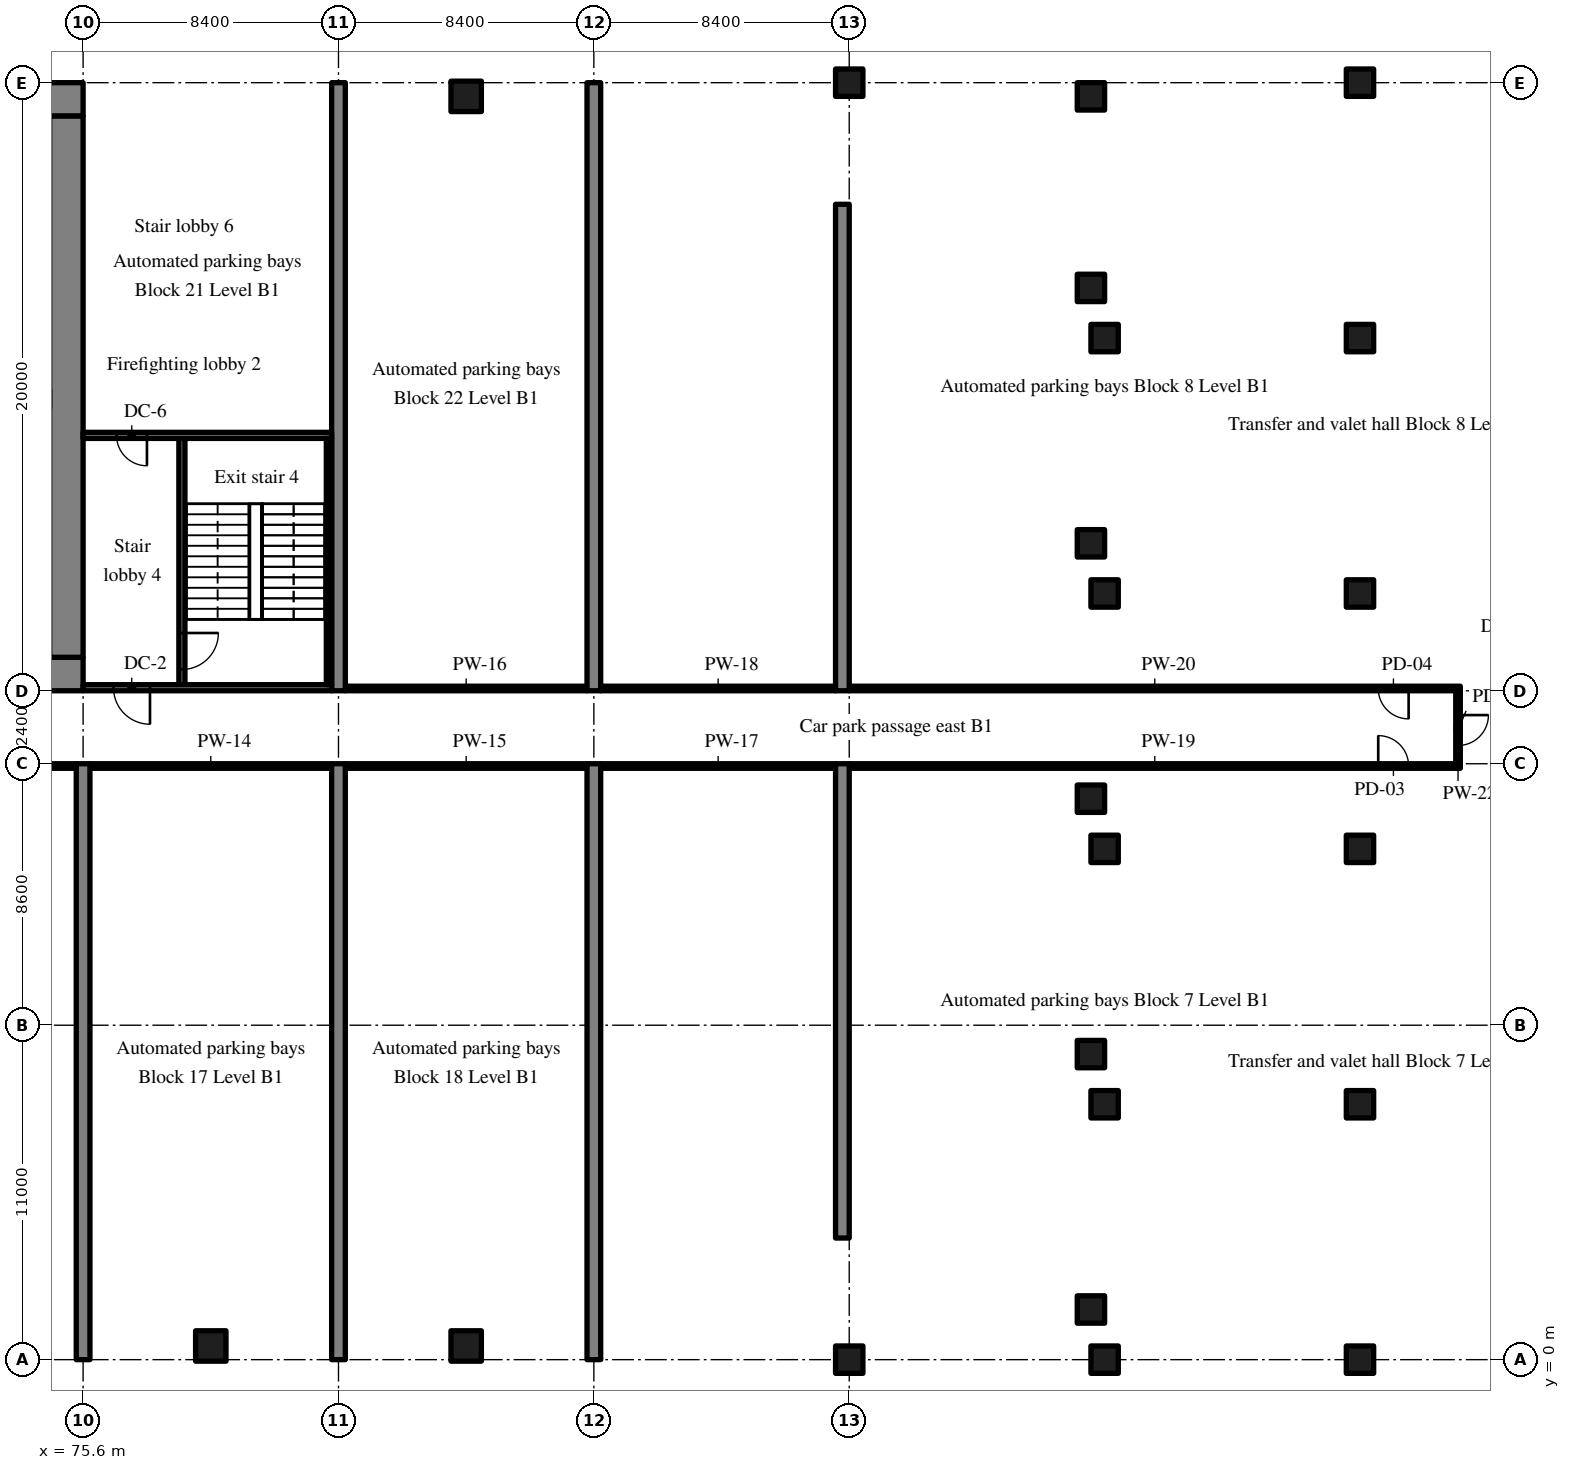
"""IFC4 building model, lengths in metres.
Left out: names, types, materials, properties, quantities, classifications, styles, units other than length and angle.
Written with IfcOpenShell. Run it as: python <this file> out.ifc"""

import sys

from ifc_helpers import new_model, si_unit, direction, frame, frame_2d, origin, origin_2d, place, context, subcontext, project, spatial, rectangle, extrude, source, transform, mapped, element, fill, save


model = new_model("IFC4")
c1 = context("Model", 3, precision=1e-05, world=origin(), true_north=direction((0.0, 1.0)))
c2 = subcontext(c1, "Body", "Model", "MODEL_VIEW")
j1 = project(units=[si_unit("LENGTHUNIT", "METRE"), si_unit("PLANEANGLEUNIT", "RADIAN")], contexts=[c1])
p1 = place(None, origin())
s1 = spatial("IfcSite", under=j1, at=p1, CompositionType="ELEMENT")
p2 = place(p1, origin())
s2 = spatial("IfcBuilding", under=s1, at=p2, CompositionType="ELEMENT")
p3 = place(p2, frame((0.0, 0.0, -4.5)))
s3 = spatial("IfcBuildingStorey", under=s2, at=p3, CompositionType="ELEMENT", Elevation=-4.5)
m1 = source(origin(), c2, "Body", "SweptSolid", [
    extrude(rectangle(XDim=50.4, YDim=1.1, at=frame_2d((25.2, 0.0))), origin(), (0.0, 0.0, 1.0), 4.22),
])
p4 = place(p3, frame((25.2, 22.55, 0.0), z_axis=(0.0, 0.0, 1.0), x_axis=(1.0, 0.0, 0.0)))
e1 = element("IfcWall", 1, at=p4, inside=s3, PredefinedType="SHEAR", context=c2, shape_type="MappedRepresentation", body=[
    mapped(m1, transform((0.0, 0.0, 0.0), scale=1.0)),
])
m2 = source(origin(), c2, "Body", "SweptSolid", [
    extrude(rectangle(XDim=1.8, YDim=2.1, at=frame_2d((0.9, 1.05))), frame((0.0, 0.56, 0.0), z_axis=(0.0, -1.0, 0.0), x_axis=(1.0, 0.0, 0.0)), (0.0, 0.0, 1.0), 1.12),
])
p5 = place(p4, frame((15.9, 0.0, 0.0)))
e2 = element("IfcOpeningElement", 2, at=p5, cuts=e1, PredefinedType="OPENING", context=c2, shape_type="MappedRepresentation", body=[
    mapped(m2, transform((0.0, 0.0, 0.0), scale=1.0)),
])
m3 = source(origin(), c2, "Body", "SweptSolid", [
    extrude(rectangle(XDim=1.2, YDim=2.1, at=frame_2d((0.6, 1.05))), frame((0.0, 0.56, 0.0), z_axis=(0.0, -1.0, 0.0), x_axis=(1.0, 0.0, 0.0)), (0.0, 0.0, 1.0), 1.12),
])
p6 = place(p4, frame((27.0, 0.0, 0.0)))
e3 = element("IfcOpeningElement", 3, at=p6, cuts=e1, PredefinedType="OPENING", context=c2, shape_type="MappedRepresentation", body=[
    mapped(m3, transform((0.0, 0.0, 0.0), scale=1.0)),
])
m4 = source(origin(), c2, "Body", "SweptSolid", [
    extrude(rectangle(XDim=0.9, YDim=2.1, at=frame_2d((0.45, 1.05))), frame((0.0, 0.56, 0.0), z_axis=(0.0, -1.0, 0.0), x_axis=(1.0, 0.0, 0.0)), (0.0, 0.0, 1.0), 1.12),
])
p7 = place(p4, frame((34.5, 0.0, 0.0)))
e4 = element("IfcOpeningElement", 4, at=p7, cuts=e1, PredefinedType="OPENING", context=c2, shape_type="MappedRepresentation", body=[
    mapped(m4, transform((0.0, 0.0, 0.0), scale=1.0)),
])
p8 = place(p4, frame((31.5, 0.0, 0.0)))
e5 = element("IfcOpeningElement", 5, at=p8, cuts=e1, PredefinedType="OPENING", context=c2, shape_type="MappedRepresentation", body=[
    mapped(m4, transform((0.0, 0.0, 0.0), scale=1.0)),
])
p9 = place(p4, frame((39.75, 0.0, 0.0)))
e6 = element("IfcOpeningElement", 6, at=p9, cuts=e1, PredefinedType="OPENING", context=c2, shape_type="MappedRepresentation", body=[
    mapped(m4, transform((0.0, 0.0, 0.0), scale=1.0)),
])
p10 = place(p4, frame((36.75, 0.0, 0.0)))
e7 = element("IfcOpeningElement", 7, at=p10, cuts=e1, PredefinedType="OPENING", context=c2, shape_type="MappedRepresentation", body=[
    mapped(m4, transform((0.0, 0.0, 0.0), scale=1.0)),
])
p11 = place(p4, frame((6.425, 0.0, 0.0)))
e8 = element("IfcOpeningElement", 8, at=p11, cuts=e1, PredefinedType="OPENING", context=c2, shape_type="MappedRepresentation", body=[
    mapped(m3, transform((0.0, 0.0, 0.0), scale=1.0)),
])
p12 = place(p4, frame((47.675, 0.0, 0.0)))
e9 = element("IfcOpeningElement", 9, at=p12, cuts=e1, PredefinedType="OPENING", context=c2, shape_type="MappedRepresentation", body=[
    mapped(m3, transform((0.0, 0.0, 0.0), scale=1.0)),
])
p13 = place(p3, frame((25.2, 41.45, 0.0), z_axis=(0.0, 0.0, 1.0), x_axis=(1.0, 0.0, 0.0)))
e10 = element("IfcWall", 10, at=p13, inside=s3, PredefinedType="SHEAR", context=c2, shape_type="MappedRepresentation", body=[
    mapped(m1, transform((0.0, 0.0, 0.0), scale=1.0)),
])
m5 = source(origin(), c2, "Body", "SweptSolid", [
    extrude(rectangle(XDim=17.8, YDim=1.1, at=frame_2d((8.9, 0.0))), origin(), (0.0, 0.0, 1.0), 4.22),
])
p14 = place(p3, frame((75.05, 23.1, 0.0), z_axis=(0.0, 0.0, 1.0), x_axis=(0.0, 1.0, 0.0)))
e11 = element("IfcWall", 11, at=p14, inside=s3, PredefinedType="SHEAR", context=c2, shape_type="MappedRepresentation", body=[
    mapped(m5, transform((0.0, 0.0, 0.0), scale=1.0)),
])
m6 = source(origin(), c2, "Body", "SweptSolid", [
    extrude(rectangle(XDim=19.6, YDim=0.45, at=frame_2d((9.8, 0.0))), origin(), (0.0, 0.0, 1.0), 4.22),
])
for number, where, z_axis, x_axis in (
    (12, (75.6, 0.0, 0.0), (0.0, 0.0, 1.0), (0.0, 1.0, 0.0)),
    (13, (84.0, 0.0, 0.0), (0.0, 0.0, 1.0), (0.0, 1.0, 0.0)),
):
    element("IfcWall", number, at=place(p3, frame(where, z_axis=z_axis, x_axis=x_axis)), inside=s3, PredefinedType="SHEAR", context=c2, shape_type="MappedRepresentation", body=[
        mapped(m6, transform((0.0, 0.0, 0.0), scale=1.0)),
    ])
m7 = source(origin(), c2, "Body", "SweptSolid", [
    extrude(rectangle(XDim=20.0, YDim=0.45, at=frame_2d((10.0, 0.0))), origin(), (0.0, 0.0, 1.0), 4.22),
])
p15 = place(p3, frame((84.0, 22.0, 0.0), z_axis=(0.0, 0.0, 1.0), x_axis=(0.0, 1.0, 0.0)))
e14 = element("IfcWall", 14, at=p15, inside=s3, PredefinedType="SHEAR", context=c2, shape_type="MappedRepresentation", body=[
    mapped(m7, transform((0.0, 0.0, 0.0), scale=1.0)),
])
p16 = place(p3, frame((92.4, 0.0, 0.0), z_axis=(0.0, 0.0, 1.0), x_axis=(0.0, 1.0, 0.0)))
e15 = element("IfcWall", 15, at=p16, inside=s3, PredefinedType="SHEAR", context=c2, shape_type="MappedRepresentation", body=[
    mapped(m6, transform((0.0, 0.0, 0.0), scale=1.0)),
])
p17 = place(p3, frame((92.4, 22.0, 0.0), z_axis=(0.0, 0.0, 1.0), x_axis=(0.0, 1.0, 0.0)))
e16 = element("IfcWall", 16, at=p17, inside=s3, PredefinedType="SHEAR", context=c2, shape_type="MappedRepresentation", body=[
    mapped(m7, transform((0.0, 0.0, 0.0), scale=1.0)),
])
m8 = source(origin(), c2, "Body", "SweptSolid", [
    extrude(rectangle(XDim=15.6, YDim=0.45, at=frame_2d((7.8, 0.0))), origin(), (0.0, 0.0, 1.0), 4.22),
])
p18 = place(p3, frame((100.575, 4.0, 0.0), z_axis=(0.0, 0.0, 1.0), x_axis=(0.0, 1.0, 0.0)))
e17 = element("IfcWall", 17, at=p18, inside=s3, PredefinedType="SHEAR", context=c2, shape_type="MappedRepresentation", body=[
    mapped(m8, transform((0.0, 0.0, 0.0), scale=1.0)),
])
m9 = source(origin(), c2, "Body", "SweptSolid", [
    extrude(rectangle(XDim=16.0, YDim=0.45, at=frame_2d((8.0, 0.0))), origin(), (0.0, 0.0, 1.0), 4.22),
])
p19 = place(p3, frame((100.575, 22.0, 0.0), z_axis=(0.0, 0.0, 1.0), x_axis=(0.0, 1.0, 0.0)))
e18 = element("IfcWall", 18, at=p19, inside=s3, PredefinedType="SHEAR", context=c2, shape_type="MappedRepresentation", body=[
    mapped(m9, transform((0.0, 0.0, 0.0), scale=1.0)),
])
m10 = source(origin(), c2, "Body", "SweptSolid", [
    extrude(rectangle(XDim=1.0, YDim=1.0, at=origin_2d()), origin(), (0.0, 0.0, 1.0), 4.22),
])
for number, where, z_axis, x_axis in (
    (19, (79.8, 0.45, 0.0), (0.0, 0.0, 1.0), (1.0, 0.0, 0.0)),
    (20, (88.2, 0.45, 0.0), (0.0, 0.0, 1.0), (1.0, 0.0, 0.0)),
    (21, (88.2, 41.55, 0.0), (0.0, 0.0, 1.0), (1.0, 0.0, 0.0)),
):
    element("IfcColumn", number, at=place(p3, frame(where, z_axis=z_axis, x_axis=x_axis)), inside=s3, PredefinedType="COLUMN", context=c2, shape_type="MappedRepresentation", body=[
        mapped(m10, transform((0.0, 0.0, 0.0), scale=1.0)),
    ])
m11 = source(origin(), c2, "Body", "SweptSolid", [
    extrude(rectangle(XDim=0.9, YDim=0.9, at=origin_2d()), origin(), (0.0, 0.0, 1.0), 4.22),
])
for number, where, z_axis, x_axis in (
    (22, (108.75, 1.65, 0.0), (0.0, 0.0, 1.0), (1.0, 0.0, 0.0)),
    (23, (108.75, 10.05, 0.0), (0.0, 0.0, 1.0), (1.0, 0.0, 0.0)),
    (24, (108.75, 18.45, 0.0), (0.0, 0.0, 1.0), (1.0, 0.0, 0.0)),
    (25, (108.75, 26.85, 0.0), (0.0, 0.0, 1.0), (1.0, 0.0, 0.0)),
    (26, (108.75, 35.25, 0.0), (0.0, 0.0, 1.0), (1.0, 0.0, 0.0)),
    (27, (108.75, 41.55, 0.0), (0.0, 0.0, 1.0), (1.0, 0.0, 0.0)),
    (28, (100.8, 0.0, 0.0), (0.0, 0.0, 1.0), (1.0, 0.0, 0.0)),
    (29, (100.8, 42.0, 0.0), (0.0, 0.0, 1.0), (1.0, 0.0, 0.0)),
    (30, (109.2, 0.0, 0.0), (0.0, 0.0, 1.0), (1.0, 0.0, 0.0)),
    (31, (109.2, 8.4, 0.0), (0.0, 0.0, 1.0), (1.0, 0.0, 0.0)),
    (32, (109.2, 16.8, 0.0), (0.0, 0.0, 1.0), (1.0, 0.0, 0.0)),
    (33, (109.2, 25.2, 0.0), (0.0, 0.0, 1.0), (1.0, 0.0, 0.0)),
    (34, (109.2, 33.6, 0.0), (0.0, 0.0, 1.0), (1.0, 0.0, 0.0)),
    (35, (117.6, 0.0, 0.0), (0.0, 0.0, 1.0), (1.0, 0.0, 0.0)),
    (36, (117.6, 8.4, 0.0), (0.0, 0.0, 1.0), (1.0, 0.0, 0.0)),
    (37, (117.6, 16.8, 0.0), (0.0, 0.0, 1.0), (1.0, 0.0, 0.0)),
    (38, (117.6, 25.2, 0.0), (0.0, 0.0, 1.0), (1.0, 0.0, 0.0)),
    (39, (117.6, 33.6, 0.0), (0.0, 0.0, 1.0), (1.0, 0.0, 0.0)),
    (40, (117.6, 42.0, 0.0), (0.0, 0.0, 1.0), (1.0, 0.0, 0.0)),
):
    element("IfcColumn", number, at=place(p3, frame(where, z_axis=z_axis, x_axis=x_axis)), inside=s3, PredefinedType="COLUMN", context=c2, shape_type="MappedRepresentation", body=[
        mapped(m11, transform((0.0, 0.0, 0.0), scale=1.0)),
    ])
m12 = source(origin(), c2, "Body", "SweptSolid", [
    extrude(rectangle(XDim=8.3, YDim=0.2, at=frame_2d((4.15, 0.0))), origin(), (0.0, 0.0, 1.0), 4.22),
])
p20 = place(p3, frame((78.85, 22.1, 0.0), z_axis=(0.0, 0.0, 1.0), x_axis=(0.0, 1.0, 0.0)))
e41 = element("IfcWall", 41, at=p20, inside=s3, PredefinedType="SOLIDWALL", context=c2, shape_type="MappedRepresentation", body=[
    mapped(m12, transform((0.0, 0.0, 0.0), scale=1.0)),
])
m13 = source(origin(), c2, "Body", "SweptSolid", [
    extrude(rectangle(XDim=1.2, YDim=2.1, at=frame_2d((0.6, 1.05))), frame((0.0, 0.11, 0.0), z_axis=(0.0, -1.0, 0.0), x_axis=(1.0, 0.0, 0.0)), (0.0, 0.0, 1.0), 0.22),
])
p21 = place(p20, frame((0.6, 0.0, 0.0)))
e42 = element("IfcOpeningElement", 42, at=p21, cuts=e41, PredefinedType="OPENING", context=c2, shape_type="MappedRepresentation", body=[
    mapped(m13, transform((0.0, 0.0, 0.0), scale=1.0)),
])
m14 = source(origin(), c2, "Body", "SweptSolid", [
    extrude(rectangle(XDim=8.175, YDim=0.2, at=frame_2d((4.087, 0.0))), origin(), (0.0, 0.0, 1.0), 4.22),
])
p22 = place(p3, frame((83.775, 22.1, 0.0), z_axis=(0.0, 0.0, 1.0), x_axis=(-1.0, 0.0, 0.0)))
e43 = element("IfcWall", 43, at=p22, inside=s3, PredefinedType="SOLIDWALL", context=c2, shape_type="MappedRepresentation", body=[
    mapped(m14, transform((0.0, 0.0, 0.0), scale=1.0)),
])
p23 = place(p22, frame((5.975, 0.0, 0.0)))
e44 = element("IfcOpeningElement", 44, at=p23, cuts=e43, PredefinedType="OPENING", context=c2, shape_type="MappedRepresentation", body=[
    mapped(m13, transform((0.0, 0.0, 0.0), scale=1.0)),
])
p24 = place(p3, frame((83.775, 30.4, 0.0), z_axis=(0.0, 0.0, 1.0), x_axis=(-1.0, 0.0, 0.0)))
e45 = element("IfcWall", 45, at=p24, inside=s3, PredefinedType="SOLIDWALL", context=c2, shape_type="MappedRepresentation", body=[
    mapped(m14, transform((0.0, 0.0, 0.0), scale=1.0)),
])
m15 = source(origin(), c2, "Body", "SweptSolid", [
    extrude(rectangle(XDim=1.0, YDim=2.1, at=frame_2d((0.5, 1.05))), frame((0.0, 0.11, 0.0), z_axis=(0.0, -1.0, 0.0), x_axis=(1.0, 0.0, 0.0)), (0.0, 0.0, 1.0), 0.22),
])
p25 = place(p24, frame((6.075, 0.0, 0.0)))
e46 = element("IfcOpeningElement", 46, at=p25, cuts=e45, PredefinedType="OPENING", context=c2, shape_type="MappedRepresentation", body=[
    mapped(m15, transform((0.0, 0.0, 0.0), scale=1.0)),
])
m16 = source(origin(), c2, "Body", "SweptSolid", [
    extrude(rectangle(XDim=8.1, YDim=0.175, at=frame_2d((4.05, 0.0))), origin(), (0.0, 0.0, 1.0), 4.22),
])
p26 = place(p3, frame((83.688, 22.2, 0.0), z_axis=(0.0, 0.0, 1.0), x_axis=(0.0, 1.0, 0.0)))
e47 = element("IfcWall", 47, at=p26, inside=s3, PredefinedType="SOLIDWALL", context=c2, shape_type="MappedRepresentation", body=[
    mapped(m16, transform((0.0, 0.0, 0.0), scale=1.0)),
])
m17 = source(origin(), c2, "Body", "SweptSolid", [
    extrude(rectangle(XDim=7.95, YDim=0.15, at=frame_2d((3.975, 0.0))), origin(), (0.0, 0.0, 1.0), 4.22),
])
for number, where, z_axis, x_axis in (
    (48, (67.425, 19.525, 0.0), (0.0, 0.0, 1.0), (1.0, 0.0, 0.0)),
    (49, (75.825, 19.525, 0.0), (0.0, 0.0, 1.0), (1.0, 0.0, 0.0)),
    (50, (84.225, 19.525, 0.0), (0.0, 0.0, 1.0), (1.0, 0.0, 0.0)),
    (51, (84.225, 22.075, 0.0), (0.0, 0.0, 1.0), (1.0, 0.0, 0.0)),
):
    element("IfcWall", number, at=place(p3, frame(where, z_axis=z_axis, x_axis=x_axis)), inside=s3, PredefinedType="PARTITIONING", context=c2, shape_type="MappedRepresentation", body=[
        mapped(m17, transform((0.0, 0.0, 0.0), scale=1.0)),
    ])
m18 = source(origin(), c2, "Body", "SweptSolid", [
    extrude(rectangle(XDim=7.725, YDim=0.15, at=frame_2d((3.863, 0.0))), origin(), (0.0, 0.0, 1.0), 4.22),
])
for number, where, z_axis, x_axis in (
    (52, (92.625, 19.525, 0.0), (0.0, 0.0, 1.0), (1.0, 0.0, 0.0)),
    (53, (92.625, 22.075, 0.0), (0.0, 0.0, 1.0), (1.0, 0.0, 0.0)),
):
    element("IfcWall", number, at=place(p3, frame(where, z_axis=z_axis, x_axis=x_axis)), inside=s3, PredefinedType="PARTITIONING", context=c2, shape_type="MappedRepresentation", body=[
        mapped(m18, transform((0.0, 0.0, 0.0), scale=1.0)),
    ])
m19 = source(origin(), c2, "Body", "SweptSolid", [
    extrude(rectangle(XDim=20.1, YDim=0.15, at=frame_2d((10.05, 0.0))), origin(), (0.0, 0.0, 1.0), 4.22),
])
p27 = place(p3, frame((100.8, 19.525, 0.0), z_axis=(0.0, 0.0, 1.0), x_axis=(1.0, 0.0, 0.0)))
e54 = element("IfcWall", 54, at=p27, inside=s3, PredefinedType="PARTITIONING", context=c2, shape_type="MappedRepresentation", body=[
    mapped(m19, transform((0.0, 0.0, 0.0), scale=1.0)),
])
m20 = source(origin(), c2, "Body", "SweptSolid", [
    extrude(rectangle(XDim=1.0, YDim=2.1, at=frame_2d((0.5, 1.05))), frame((0.0, 0.085, 0.0), z_axis=(0.0, -1.0, 0.0), x_axis=(1.0, 0.0, 0.0)), (0.0, 0.0, 1.0), 0.17),
])
p28 = place(p27, frame((17.4, 0.0, 0.0)))
e55 = element("IfcOpeningElement", 55, at=p28, cuts=e54, PredefinedType="OPENING", context=c2, shape_type="MappedRepresentation", body=[
    mapped(m20, transform((0.0, 0.0, 0.0), scale=1.0)),
])
p29 = place(p3, frame((100.8, 22.075, 0.0), z_axis=(0.0, 0.0, 1.0), x_axis=(1.0, 0.0, 0.0)))
e56 = element("IfcWall", 56, at=p29, inside=s3, PredefinedType="PARTITIONING", context=c2, shape_type="MappedRepresentation", body=[
    mapped(m19, transform((0.0, 0.0, 0.0), scale=1.0)),
])
p30 = place(p29, frame((17.4, 0.0, 0.0)))
e57 = element("IfcOpeningElement", 57, at=p30, cuts=e56, PredefinedType="OPENING", context=c2, shape_type="MappedRepresentation", body=[
    mapped(m20, transform((0.0, 0.0, 0.0), scale=1.0)),
])
m21 = source(origin(), c2, "Body", "SweptSolid", [
    extrude(rectangle(XDim=2.4, YDim=0.15, at=frame_2d((1.2, 0.0))), origin(), (0.0, 0.0, 1.0), 4.22),
])
p31 = place(p3, frame((120.825, 19.6, 0.0), z_axis=(0.0, 0.0, 1.0), x_axis=(0.0, 1.0, 0.0)))
e58 = element("IfcWall", 58, at=p31, inside=s3, PredefinedType="PARTITIONING", context=c2, shape_type="MappedRepresentation", body=[
    mapped(m21, transform((0.0, 0.0, 0.0), scale=1.0)),
])
p32 = place(p31, frame((0.6, 0.0, 0.0)))
e59 = element("IfcOpeningElement", 59, at=p32, cuts=e58, PredefinedType="OPENING", context=c2, shape_type="MappedRepresentation", body=[
    mapped(m20, transform((0.0, 0.0, 0.0), scale=1.0)),
])
m22 = source(origin(), c2, "Body", "SweptSolid", [
    extrude(rectangle(XDim=1.2, YDim=2.1, at=frame_2d((0.6, 1.05))), frame((0.0, 0.025, 0.0), z_axis=(0.0, -1.0, 0.0), x_axis=(1.0, 0.0, 0.0)), (0.0, 0.0, 1.0), 0.05),
])
p33 = place(p21, origin())
e60 = element("IfcDoor", 60, at=p33, inside=s3, OperationType="SINGLE_SWING_RIGHT", PredefinedType="DOOR", context=c2, shape_type="MappedRepresentation", body=[
    mapped(m22, transform((0.0, 0.0, 0.0), scale=1.0)),
])
fill(e42, e60)
p34 = place(p23, origin())
e61 = element("IfcDoor", 61, at=p34, inside=s3, OperationType="SINGLE_SWING_LEFT", PredefinedType="DOOR", context=c2, shape_type="MappedRepresentation", body=[
    mapped(m22, transform((0.0, 0.0, 0.0), scale=1.0)),
])
fill(e44, e61)
m23 = source(origin(), c2, "Body", "SweptSolid", [
    extrude(rectangle(XDim=1.0, YDim=2.1, at=frame_2d((0.5, 1.05))), frame((0.0, 0.025, 0.0), z_axis=(0.0, -1.0, 0.0), x_axis=(1.0, 0.0, 0.0)), (0.0, 0.0, 1.0), 0.05),
])
p35 = place(p25, origin())
e62 = element("IfcDoor", 62, at=p35, inside=s3, OperationType="SINGLE_SWING_LEFT", PredefinedType="DOOR", context=c2, shape_type="MappedRepresentation", body=[
    mapped(m23, transform((0.0, 0.0, 0.0), scale=1.0)),
])
fill(e46, e62)
p36 = place(p28, origin())
e63 = element("IfcDoor", 63, at=p36, inside=s3, OperationType="SINGLE_SWING_LEFT", PredefinedType="DOOR", context=c2, shape_type="MappedRepresentation", body=[
    mapped(m23, transform((0.0, 0.0, 0.0), scale=1.0)),
])
fill(e55, e63)
p37 = place(p30, origin())
e64 = element("IfcDoor", 64, at=p37, inside=s3, OperationType="SINGLE_SWING_RIGHT", PredefinedType="DOOR", context=c2, shape_type="MappedRepresentation", body=[
    mapped(m23, transform((0.0, 0.0, 0.0), scale=1.0)),
])
fill(e57, e64)
p38 = place(p32, origin())
e65 = element("IfcDoor", 65, at=p38, inside=s3, OperationType="SINGLE_SWING_RIGHT", PredefinedType="DOOR", context=c2, shape_type="MappedRepresentation", body=[
    mapped(m23, transform((0.0, 0.0, 0.0), scale=1.0)),
])
fill(e59, e65)
save(model, sys.argv[1])
